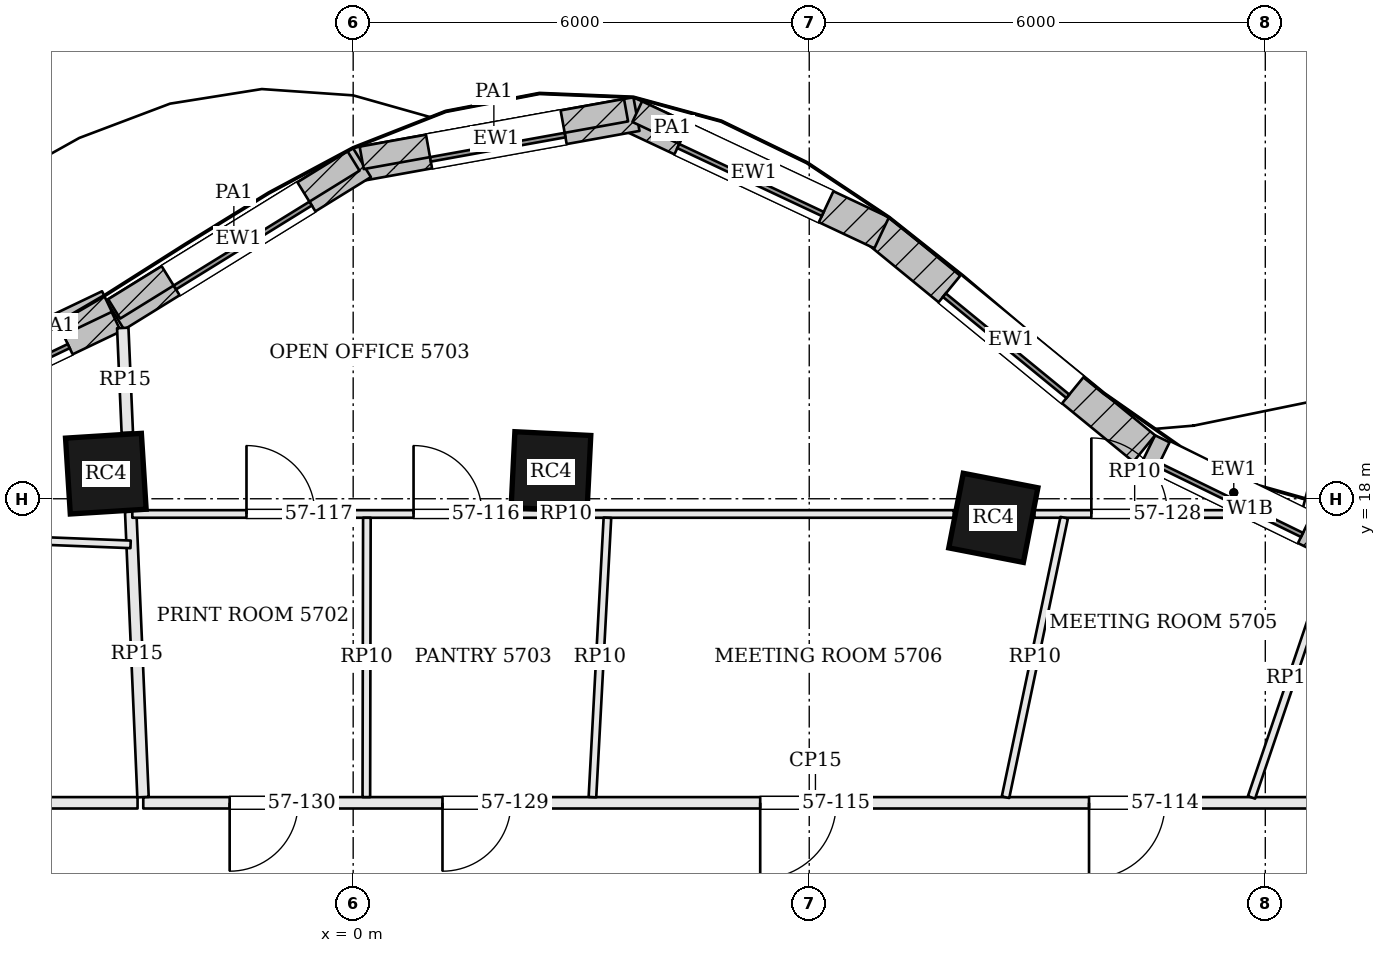
"""IFC4 building model, lengths in metres.
Left out: names, types, materials, properties, quantities, classifications, styles, units other than length and angle.
Written with IfcOpenShell. Run it as: python <this file> out.ifc"""

import sys

from ifc_helpers import new_model, si_unit, direction, frame, frame_2d, origin, origin_2d, place, context, subcontext, project, spatial, rectangle, extrude, element, fill, save


model = new_model("IFC4")
c1 = context("Model", 3, precision=1e-05, world=origin(), true_north=direction((0.0, 1.0)))
c2 = subcontext(c1, "Body", "Model", "MODEL_VIEW")
j1 = project(units=[si_unit("LENGTHUNIT", "METRE"), si_unit("PLANEANGLEUNIT", "RADIAN")], contexts=[c1])
p1 = place(None, origin())
s1 = spatial("IfcSite", under=j1, at=p1, CompositionType="ELEMENT")
p2 = place(p1, origin())
s2 = spatial("IfcBuilding", under=s1, at=p2, CompositionType="ELEMENT")
p3 = place(p2, frame((0.0, 0.0, 233.1)))
s3 = spatial("IfcBuildingStorey", under=s2, at=p3, CompositionType="ELEMENT", Elevation=233.1)
for number, where, z_axis, x_axis in (
    (1, (8.422, 17.749, 0.0), (0.0, 0.0, 1.0), (-0.982, 0.191, 0.0)),
    (2, (2.602, 18.358, 0.0), (0.0, 0.0, 1.0), (-0.999, 0.05, 0.0)),
    (3, (-3.254, 18.33, 0.0), (0.0, 0.0, 1.0), (-0.998, -0.063, 0.0)),
):
    element("IfcColumn", number, at=place(p3, frame(where, z_axis=z_axis, x_axis=x_axis)), inside=s3, PredefinedType="COLUMN", context=c2, shape_type="SweptSolid", body=[
        extrude(rectangle(XDim=1.0, YDim=1.0, at=origin_2d()), origin(), (0.0, 0.0, 1.0), 3.9),
    ])
p4 = place(p3, frame((12.719, 17.526, 0.0), z_axis=(0.0, 0.0, 1.0), x_axis=(-0.898643806462, 0.438679050226, 0.0)))
e4 = element("IfcWall", 4, at=p4, inside=s3, PredefinedType="SOLIDWALL", context=c2, shape_type="SweptSolid", body=[
    extrude(rectangle(XDim=2.523, YDim=0.45, at=frame_2d((1.262, 0.0))), origin(), (0.0, 0.0, 1.0), 3.7),
])
p5 = place(p4, frame((0.212, 0.0, 0.9)))
e5 = element("IfcOpeningElement", 5, at=p5, cuts=e4, PredefinedType="OPENING", context=c2, shape_type="SweptSolid", body=[
    extrude(rectangle(XDim=2.1, YDim=2.3, at=frame_2d((1.05, 1.15))), frame((0.0, 0.235, 0.0), z_axis=(0.0, -1.0, 0.0), x_axis=(1.0, 0.0, 0.0)), (0.0, 0.0, 1.0), 0.47),
])
p6 = place(p3, frame((10.407, 18.661, 0.0), z_axis=(0.0, 0.0, 1.0), x_axis=(-0.773702458947, 0.633549133864, 0.0)))
e6 = element("IfcWall", 6, at=p6, inside=s3, PredefinedType="SOLIDWALL", context=c2, shape_type="SweptSolid", body=[
    extrude(rectangle(XDim=4.526, YDim=0.45, at=frame_2d((2.263, 0.0))), origin(), (0.0, 0.0, 1.0), 3.7),
])
p7 = place(p6, frame((1.213, 0.0, 0.9)))
e7 = element("IfcOpeningElement", 7, at=p7, cuts=e6, PredefinedType="OPENING", context=c2, shape_type="SweptSolid", body=[
    extrude(rectangle(XDim=2.1, YDim=2.3, at=frame_2d((1.05, 1.15))), frame((0.0, 0.235, 0.0), z_axis=(0.0, -1.0, 0.0), x_axis=(1.0, 0.0, 0.0)), (0.0, 0.0, 1.0), 0.47),
])
p8 = place(p3, frame((6.953, 21.499, 0.0), z_axis=(0.0, 0.0, 1.0), x_axis=(-0.905034581957, 0.425337989676, 0.0)))
e8 = element("IfcWall", 8, at=p8, inside=s3, PredefinedType="SOLIDWALL", context=c2, shape_type="SweptSolid", body=[
    extrude(rectangle(XDim=3.714, YDim=0.45, at=frame_2d((1.857, 0.0))), origin(), (0.0, 0.0, 1.0), 3.7),
])
p9 = place(p8, frame((0.807, 0.0, 0.9)))
e9 = element("IfcOpeningElement", 9, at=p9, cuts=e8, PredefinedType="OPENING", context=c2, shape_type="SweptSolid", body=[
    extrude(rectangle(XDim=2.1, YDim=2.3, at=frame_2d((1.05, 1.15))), frame((0.0, 0.235, 0.0), z_axis=(0.0, -1.0, 0.0), x_axis=(1.0, 0.0, 0.0)), (0.0, 0.0, 1.0), 0.47),
])
p10 = place(p3, frame((3.727, 23.061, 0.0), z_axis=(0.0, 0.0, 1.0), x_axis=(-0.984119180424, -0.177508982087, 0.0)))
e10 = element("IfcWall", 10, at=p10, inside=s3, PredefinedType="SOLIDWALL", context=c2, shape_type="SweptSolid", body=[
    extrude(rectangle(XDim=3.747, YDim=0.45, at=frame_2d((1.873, 0.0))), origin(), (0.0, 0.0, 1.0), 3.7),
])
p11 = place(p10, frame((0.973, 0.0, 0.9)))
e11 = element("IfcOpeningElement", 11, at=p11, cuts=e10, PredefinedType="OPENING", context=c2, shape_type="SweptSolid", body=[
    extrude(rectangle(XDim=1.8, YDim=2.3, at=frame_2d((0.9, 1.15))), frame((0.0, 0.235, 0.0), z_axis=(0.0, -1.0, 0.0), x_axis=(1.0, 0.0, 0.0)), (0.0, 0.0, 1.0), 0.47),
])
p12 = place(p3, frame((0.115, 22.424, 0.0), z_axis=(0.0, 0.0, 1.0), x_axis=(-0.8506970368, -0.525656305564, 0.0)))
e12 = element("IfcWall", 12, at=p12, inside=s3, PredefinedType="SOLIDWALL", context=c2, shape_type="SweptSolid", body=[
    extrude(rectangle(XDim=3.816, YDim=0.45, at=frame_2d((1.908, 0.0))), origin(), (0.0, 0.0, 1.0), 3.7),
])
p13 = place(p12, frame((0.858, 0.0, 0.9)))
e13 = element("IfcOpeningElement", 13, at=p13, cuts=e12, PredefinedType="OPENING", context=c2, shape_type="SweptSolid", body=[
    extrude(rectangle(XDim=2.1, YDim=2.3, at=frame_2d((1.05, 1.15))), frame((0.0, 0.235, 0.0), z_axis=(0.0, -1.0, 0.0), x_axis=(1.0, 0.0, 0.0)), (0.0, 0.0, 1.0), 0.47),
])
p14 = place(p3, frame((-3.154, 20.406, 0.0), z_axis=(0.0, 0.0, 1.0), x_axis=(-0.902333313, -0.431038968367, 0.0)))
e14 = element("IfcWall", 14, at=p14, inside=s3, PredefinedType="SOLIDWALL", context=c2, shape_type="SweptSolid", body=[
    extrude(rectangle(XDim=3.505, YDim=0.45, at=frame_2d((1.753, 0.0))), origin(), (0.0, 0.0, 1.0), 3.7),
])
p15 = place(p14, frame((0.703, 0.0, 0.9)))
e15 = element("IfcOpeningElement", 15, at=p15, cuts=e14, PredefinedType="OPENING", context=c2, shape_type="SweptSolid", body=[
    extrude(rectangle(XDim=2.1, YDim=2.3, at=frame_2d((1.05, 1.15))), frame((0.0, 0.235, 0.0), z_axis=(0.0, -1.0, 0.0), x_axis=(1.0, 0.0, 0.0)), (0.0, 0.0, 1.0), 0.47),
])
p16 = place(p3, frame((4.667, 22.656, 3.9), z_axis=(0.0, 0.0, 1.0), x_axis=(-0.905050240273, 0.425304670304, 0.0)))
e16 = element("IfcWall", 16, at=p16, inside=s3, PredefinedType="PARAPET", context=c2, shape_type="SweptSolid", body=[
    extrude(rectangle(XDim=1.027, YDim=0.3, at=frame_2d((0.513, 0.0))), origin(), (0.0, 0.0, 1.0), 1.1),
])
p17 = place(p3, frame((3.59, 23.112, 3.9), z_axis=(0.0, 0.0, 1.0), x_axis=(-0.984124248147, -0.177480884064, 0.0)))
e17 = element("IfcWall", 17, at=p17, inside=s3, PredefinedType="PARAPET", context=c2, shape_type="SweptSolid", body=[
    extrude(rectangle(XDim=3.534, YDim=0.3, at=frame_2d((1.767, 0.0))), origin(), (0.0, 0.0, 1.0), 1.1),
])
p18 = place(p3, frame((0.005, 22.444, 3.9), z_axis=(0.0, 0.0, 1.0), x_axis=(-0.850710394144, -0.525634688063, 0.0)))
e18 = element("IfcWall", 18, at=p18, inside=s3, PredefinedType="PARAPET", context=c2, shape_type="SweptSolid", body=[
    extrude(rectangle(XDim=3.702, YDim=0.3, at=frame_2d((1.851, 0.0))), origin(), (0.0, 0.0, 1.0), 1.1),
])
p19 = place(p3, frame((-3.239, 20.594, 3.9), z_axis=(0.0, 0.0, 1.0), x_axis=(-0.902344893923, -0.431014724123, 0.0)))
e19 = element("IfcWall", 19, at=p19, inside=s3, PredefinedType="PARAPET", context=c2, shape_type="SweptSolid", body=[
    extrude(rectangle(XDim=1.49, YDim=0.3, at=frame_2d((0.745, 0.0))), origin(), (0.0, 0.0, 1.0), 1.1),
])
p20 = place(p3, frame((14.925, 14.0, 0.0), z_axis=(0.0, 0.0, 1.0), x_axis=(-1.0, 0.0, 0.0)))
e20 = element("IfcWall", 20, at=p20, inside=s3, PredefinedType="PARTITIONING", context=c2, shape_type="SweptSolid", body=[
    extrude(rectangle(XDim=17.687, YDim=0.15, at=frame_2d((8.843, 0.0))), origin(), (0.0, 0.0, 1.0), 3.084),
])
p21 = place(p20, frame((0.45, 0.0, 0.0)))
e21 = element("IfcOpeningElement", 21, at=p21, cuts=e20, PredefinedType="OPENING", context=c2, shape_type="SweptSolid", body=[
    extrude(rectangle(XDim=1.0, YDim=2.4, at=frame_2d((0.5, 1.2))), frame((0.0, 0.085, 0.0), z_axis=(0.0, -1.0, 0.0), x_axis=(1.0, 0.0, 0.0)), (0.0, 0.0, 1.0), 0.17),
])
p22 = place(p20, frame((4.244, 0.0, 0.0)))
e22 = element("IfcOpeningElement", 22, at=p22, cuts=e20, PredefinedType="OPENING", context=c2, shape_type="SweptSolid", body=[
    extrude(rectangle(XDim=1.0, YDim=2.4, at=frame_2d((0.5, 1.2))), frame((0.0, 0.085, 0.0), z_axis=(0.0, -1.0, 0.0), x_axis=(1.0, 0.0, 0.0)), (0.0, 0.0, 1.0), 0.17),
])
p23 = place(p20, frame((8.57, 0.0, 0.0)))
e23 = element("IfcOpeningElement", 23, at=p23, cuts=e20, PredefinedType="OPENING", context=c2, shape_type="SweptSolid", body=[
    extrude(rectangle(XDim=1.0, YDim=2.4, at=frame_2d((0.5, 1.2))), frame((0.0, 0.085, 0.0), z_axis=(0.0, -1.0, 0.0), x_axis=(1.0, 0.0, 0.0)), (0.0, 0.0, 1.0), 0.17),
])
p24 = place(p20, frame((12.85, 0.0, 0.0)))
e24 = element("IfcOpeningElement", 24, at=p24, cuts=e20, PredefinedType="OPENING", context=c2, shape_type="SweptSolid", body=[
    extrude(rectangle(XDim=0.9, YDim=2.1, at=frame_2d((0.45, 1.05))), frame((0.0, 0.085, 0.0), z_axis=(0.0, -1.0, 0.0), x_axis=(1.0, 0.0, 0.0)), (0.0, 0.0, 1.0), 0.17),
])
p25 = place(p20, frame((15.65, 0.0, 0.0)))
e25 = element("IfcOpeningElement", 25, at=p25, cuts=e20, PredefinedType="OPENING", context=c2, shape_type="SweptSolid", body=[
    extrude(rectangle(XDim=0.9, YDim=2.1, at=frame_2d((0.45, 1.05))), frame((0.0, 0.085, 0.0), z_axis=(0.0, -1.0, 0.0), x_axis=(1.0, 0.0, 0.0)), (0.0, 0.0, 1.0), 0.17),
])
p26 = place(p3, frame((-3.031, 20.247, 0.0), z_axis=(0.0, 0.0, 1.0), x_axis=(0.043176136044, -0.999067475837, 0.0)))
e26 = element("IfcWall", 26, at=p26, inside=s3, PredefinedType="PARTITIONING", context=c2, shape_type="SweptSolid", body=[
    extrude(rectangle(XDim=1.38, YDim=0.15, at=frame_2d((0.69, 0.0))), origin(), (0.0, 0.0, 1.0), 3.084),
])
p27 = place(p3, frame((-2.927, 17.83, 0.0), z_axis=(0.0, 0.0, 1.0), x_axis=(0.043135572366, -0.99906922803, 0.0)))
e27 = element("IfcWall", 27, at=p27, inside=s3, PredefinedType="PARTITIONING", context=c2, shape_type="SweptSolid", body=[
    extrude(rectangle(XDim=3.758, YDim=0.15, at=frame_2d((1.879, 0.0))), origin(), (0.0, 0.0, 1.0), 3.084),
])
p28 = place(p3, frame((-2.837, 14.0, 0.0), z_axis=(0.0, 0.0, 1.0), x_axis=(-1.0, 0.0, 0.0)))
e28 = element("IfcWall", 28, at=p28, inside=s3, PredefinedType="PARTITIONING", context=c2, shape_type="SweptSolid", body=[
    extrude(rectangle(XDim=12.163, YDim=0.15, at=frame_2d((6.082, 0.0))), origin(), (0.0, 0.0, 1.0), 3.084),
])
p29 = place(p28, frame((3.938, 0.0, 0.0)))
e29 = element("IfcOpeningElement", 29, at=p29, cuts=e28, PredefinedType="OPENING", context=c2, shape_type="SweptSolid", body=[
    extrude(rectangle(XDim=1.8, YDim=2.1, at=frame_2d((0.9, 1.05))), frame((0.0, 0.085, 0.0), z_axis=(0.0, -1.0, 0.0), x_axis=(1.0, 0.0, 0.0)), (0.0, 0.0, 1.0), 0.17),
])
p30 = place(p3, frame((-2.906, 17.8, 0.0), z_axis=(0.0, 0.0, 1.0), x_axis=(1.0, 0.0, 0.0)))
e30 = element("IfcWall", 30, at=p30, inside=s3, PredefinedType="PARTITIONING", context=c2, shape_type="SweptSolid", body=[
    extrude(rectangle(XDim=10.808, YDim=0.1, at=frame_2d((5.404, 0.0))), origin(), (0.0, 0.0, 1.0), 3.084),
])
p31 = place(p30, frame((3.7, 0.0, 0.0)))
e31 = element("IfcOpeningElement", 31, at=p31, cuts=e30, PredefinedType="OPENING", context=c2, shape_type="SweptSolid", body=[
    extrude(rectangle(XDim=0.9, YDim=2.1, at=frame_2d((0.45, 1.05))), frame((0.0, 0.06, 0.0), z_axis=(0.0, -1.0, 0.0), x_axis=(1.0, 0.0, 0.0)), (0.0, 0.0, 1.0), 0.12),
])
p32 = place(p30, frame((1.502, 0.0, 0.0)))
e32 = element("IfcOpeningElement", 32, at=p32, cuts=e30, PredefinedType="OPENING", context=c2, shape_type="SweptSolid", body=[
    extrude(rectangle(XDim=0.9, YDim=2.1, at=frame_2d((0.45, 1.05))), frame((0.0, 0.06, 0.0), z_axis=(0.0, -1.0, 0.0), x_axis=(1.0, 0.0, 0.0)), (0.0, 0.0, 1.0), 0.12),
])
p33 = place(p3, frame((8.962, 17.8, 0.0), z_axis=(0.0, 0.0, 1.0), x_axis=(1.0, 0.0, 0.0)))
e33 = element("IfcWall", 33, at=p33, inside=s3, PredefinedType="PARTITIONING", context=c2, shape_type="SweptSolid", body=[
    extrude(rectangle(XDim=2.639, YDim=0.1, at=frame_2d((1.32, 0.0))), origin(), (0.0, 0.0, 1.0), 3.084),
])
p34 = place(p33, frame((0.75, 0.0, 0.0)))
e34 = element("IfcOpeningElement", 34, at=p34, cuts=e33, PredefinedType="OPENING", context=c2, shape_type="SweptSolid", body=[
    extrude(rectangle(XDim=1.0, YDim=2.4, at=frame_2d((0.5, 1.2))), frame((0.0, 0.06, 0.0), z_axis=(0.0, -1.0, 0.0), x_axis=(1.0, 0.0, 0.0)), (0.0, 0.0, 1.0), 0.12),
])
p35 = place(p3, frame((11.819, 14.071, 0.0), z_axis=(0.0, 0.0, 1.0), x_axis=(0.320667010102, 0.947191991432, 0.0)))
e35 = element("IfcWall", 35, at=p35, inside=s3, PredefinedType="PARTITIONING", context=c2, shape_type="SweptSolid", body=[
    extrude(rectangle(XDim=3.33, YDim=0.1, at=frame_2d((1.665, 0.0))), origin(), (0.0, 0.0, 1.0), 3.084),
])
p36 = place(p3, frame((8.583, 14.073, 0.0), z_axis=(0.0, 0.0, 1.0), x_axis=(0.20542763149, 0.978672308907, 0.0)))
e36 = element("IfcWall", 36, at=p36, inside=s3, PredefinedType="PARTITIONING", context=c2, shape_type="SweptSolid", body=[
    extrude(rectangle(XDim=3.758, YDim=0.1, at=frame_2d((1.879, 0.0))), origin(), (0.0, 0.0, 1.0), 3.084),
])
p37 = place(p3, frame((3.148, 14.075, 0.0), z_axis=(0.0, 0.0, 1.0), x_axis=(0.053599846938, 0.998562494994, 0.0)))
e37 = element("IfcWall", 37, at=p37, inside=s3, PredefinedType="PARTITIONING", context=c2, shape_type="SweptSolid", body=[
    extrude(rectangle(XDim=3.68, YDim=0.1, at=frame_2d((1.84, 0.0))), origin(), (0.0, 0.0, 1.0), 3.084),
])
p38 = place(p3, frame((0.173, 14.075, 0.0), z_axis=(0.0, 0.0, 1.0), x_axis=(0.001992954256, 0.999998014065, 0.0)))
e38 = element("IfcWall", 38, at=p38, inside=s3, PredefinedType="PARTITIONING", context=c2, shape_type="SweptSolid", body=[
    extrude(rectangle(XDim=3.675, YDim=0.1, at=frame_2d((1.837, 0.0))), origin(), (0.0, 0.0, 1.0), 3.084),
])
p39 = place(p3, frame((-8.53, 17.621, 0.0), z_axis=(0.0, 0.0, 1.0), x_axis=(0.999224779049, -0.039368019188, 0.0)))
e39 = element("IfcWall", 39, at=p39, inside=s3, PredefinedType="PARTITIONING", context=c2, shape_type="SweptSolid", body=[
    extrude(rectangle(XDim=5.606, YDim=0.1, at=frame_2d((2.803, 0.0))), origin(), (0.0, 0.0, 1.0), 3.084),
])
p40 = place(p5, origin())
e40 = element("IfcWindow", 40, at=p40, inside=s3, PartitioningType="SINGLE_PANEL", PredefinedType="WINDOW", context=c2, shape_type="SweptSolid", body=[
    extrude(rectangle(XDim=2.1, YDim=2.3, at=frame_2d((1.05, 1.15))), frame((0.0, 0.135, 0.0), z_axis=(0.0, -1.0, 0.0), x_axis=(1.0, 0.0, 0.0)), (0.0, 0.0, 1.0), 0.06),
])
fill(e5, e40)
p41 = place(p7, origin())
e41 = element("IfcWindow", 41, at=p41, inside=s3, PartitioningType="SINGLE_PANEL", PredefinedType="WINDOW", context=c2, shape_type="SweptSolid", body=[
    extrude(rectangle(XDim=2.1, YDim=2.3, at=frame_2d((1.05, 1.15))), frame((0.0, 0.135, 0.0), z_axis=(0.0, -1.0, 0.0), x_axis=(1.0, 0.0, 0.0)), (0.0, 0.0, 1.0), 0.06),
])
fill(e7, e41)
p42 = place(p9, origin())
e42 = element("IfcWindow", 42, at=p42, inside=s3, PartitioningType="SINGLE_PANEL", PredefinedType="WINDOW", context=c2, shape_type="SweptSolid", body=[
    extrude(rectangle(XDim=2.1, YDim=2.3, at=frame_2d((1.05, 1.15))), frame((0.0, 0.135, 0.0), z_axis=(0.0, -1.0, 0.0), x_axis=(1.0, 0.0, 0.0)), (0.0, 0.0, 1.0), 0.06),
])
fill(e9, e42)
p43 = place(p11, origin())
e43 = element("IfcWindow", 43, at=p43, inside=s3, PartitioningType="SINGLE_PANEL", PredefinedType="WINDOW", context=c2, shape_type="SweptSolid", body=[
    extrude(rectangle(XDim=1.8, YDim=2.3, at=frame_2d((0.9, 1.15))), frame((0.0, 0.135, 0.0), z_axis=(0.0, -1.0, 0.0), x_axis=(1.0, 0.0, 0.0)), (0.0, 0.0, 1.0), 0.06),
])
fill(e11, e43)
p44 = place(p13, origin())
e44 = element("IfcWindow", 44, at=p44, inside=s3, PartitioningType="SINGLE_PANEL", PredefinedType="WINDOW", context=c2, shape_type="SweptSolid", body=[
    extrude(rectangle(XDim=2.1, YDim=2.3, at=frame_2d((1.05, 1.15))), frame((0.0, 0.135, 0.0), z_axis=(0.0, -1.0, 0.0), x_axis=(1.0, 0.0, 0.0)), (0.0, 0.0, 1.0), 0.06),
])
fill(e13, e44)
p45 = place(p15, origin())
e45 = element("IfcWindow", 45, at=p45, inside=s3, PartitioningType="SINGLE_PANEL", PredefinedType="WINDOW", context=c2, shape_type="SweptSolid", body=[
    extrude(rectangle(XDim=2.1, YDim=2.3, at=frame_2d((1.05, 1.15))), frame((0.0, 0.135, 0.0), z_axis=(0.0, -1.0, 0.0), x_axis=(1.0, 0.0, 0.0)), (0.0, 0.0, 1.0), 0.06),
])
fill(e15, e45)
p46 = place(p22, origin())
e46 = element("IfcDoor", 46, at=p46, inside=s3, OperationType="SINGLE_SWING_RIGHT", PredefinedType="DOOR", context=c2, shape_type="SweptSolid", body=[
    extrude(rectangle(XDim=1.0, YDim=2.4, at=frame_2d((0.5, 1.2))), frame((0.0, 0.025, 0.0), z_axis=(0.0, -1.0, 0.0), x_axis=(1.0, 0.0, 0.0)), (0.0, 0.0, 1.0), 0.05),
])
fill(e22, e46)
p47 = place(p23, origin())
e47 = element("IfcDoor", 47, at=p47, inside=s3, OperationType="SINGLE_SWING_RIGHT", PredefinedType="DOOR", context=c2, shape_type="SweptSolid", body=[
    extrude(rectangle(XDim=1.0, YDim=2.4, at=frame_2d((0.5, 1.2))), frame((0.0, 0.025, 0.0), z_axis=(0.0, -1.0, 0.0), x_axis=(1.0, 0.0, 0.0)), (0.0, 0.0, 1.0), 0.05),
])
fill(e23, e47)
p48 = place(p31, origin())
e48 = element("IfcDoor", 48, at=p48, inside=s3, OperationType="SINGLE_SWING_LEFT", PredefinedType="DOOR", context=c2, shape_type="SweptSolid", body=[
    extrude(rectangle(XDim=0.9, YDim=2.1, at=frame_2d((0.45, 1.05))), frame((0.0, 0.025, 0.0), z_axis=(0.0, -1.0, 0.0), x_axis=(1.0, 0.0, 0.0)), (0.0, 0.0, 1.0), 0.05),
])
fill(e31, e48)
p49 = place(p32, origin())
e49 = element("IfcDoor", 49, at=p49, inside=s3, OperationType="SINGLE_SWING_LEFT", PredefinedType="DOOR", context=c2, shape_type="SweptSolid", body=[
    extrude(rectangle(XDim=0.9, YDim=2.1, at=frame_2d((0.45, 1.05))), frame((0.0, 0.025, 0.0), z_axis=(0.0, -1.0, 0.0), x_axis=(1.0, 0.0, 0.0)), (0.0, 0.0, 1.0), 0.05),
])
fill(e32, e49)
p50 = place(p34, origin())
e50 = element("IfcDoor", 50, at=p50, inside=s3, OperationType="SINGLE_SWING_LEFT", PredefinedType="DOOR", context=c2, shape_type="SweptSolid", body=[
    extrude(rectangle(XDim=1.0, YDim=2.4, at=frame_2d((0.5, 1.2))), frame((0.0, 0.025, 0.0), z_axis=(0.0, -1.0, 0.0), x_axis=(1.0, 0.0, 0.0)), (0.0, 0.0, 1.0), 0.05),
])
fill(e34, e50)
p51 = place(p24, origin())
e51 = element("IfcDoor", 51, at=p51, inside=s3, OperationType="SINGLE_SWING_RIGHT", PredefinedType="DOOR", context=c2, shape_type="SweptSolid", body=[
    extrude(rectangle(XDim=0.9, YDim=2.1, at=frame_2d((0.45, 1.05))), frame((0.0, 0.025, 0.0), z_axis=(0.0, -1.0, 0.0), x_axis=(1.0, 0.0, 0.0)), (0.0, 0.0, 1.0), 0.05),
])
fill(e24, e51)
p52 = place(p25, origin())
e52 = element("IfcDoor", 52, at=p52, inside=s3, OperationType="SINGLE_SWING_RIGHT", PredefinedType="DOOR", context=c2, shape_type="SweptSolid", body=[
    extrude(rectangle(XDim=0.9, YDim=2.1, at=frame_2d((0.45, 1.05))), frame((0.0, 0.025, 0.0), z_axis=(0.0, -1.0, 0.0), x_axis=(1.0, 0.0, 0.0)), (0.0, 0.0, 1.0), 0.05),
])
fill(e25, e52)
save(model, sys.argv[1])
